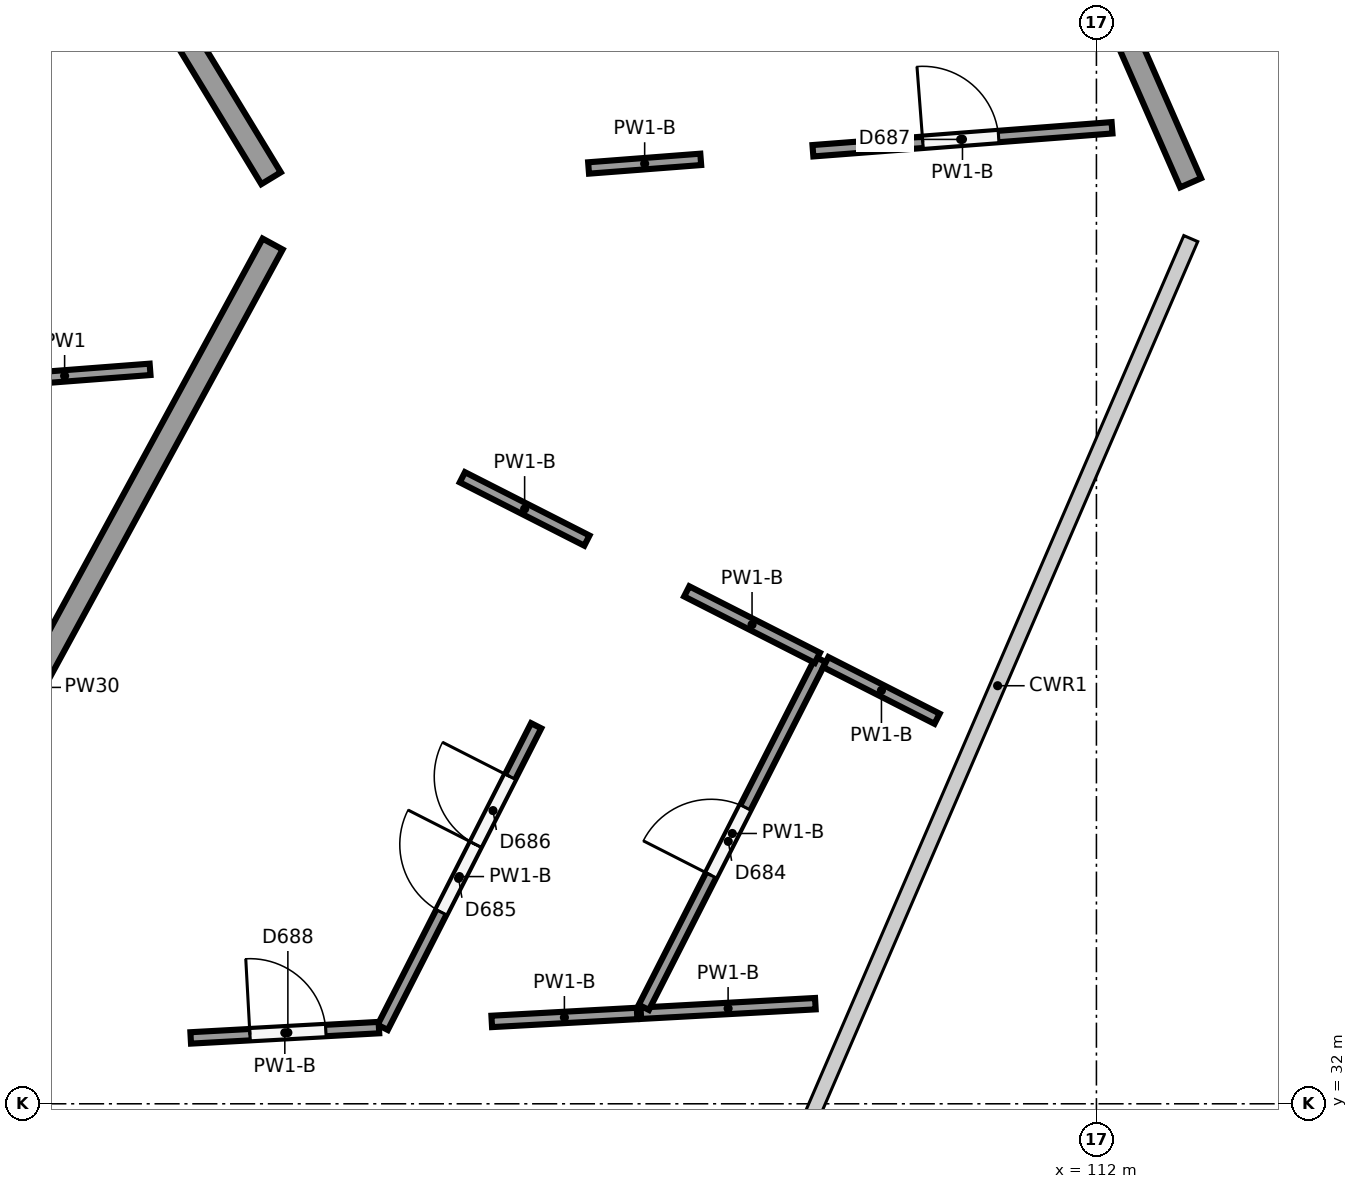
"""IFC4 building model, lengths in metres.
Left out: names, types, materials, properties, quantities, classifications, styles, units other than length and angle.
Written with IfcOpenShell. Run it as: python <this file> out.ifc"""

import sys

from ifc_helpers import new_model, si_unit, direction, frame, frame_2d, origin, origin_2d, place, context, subcontext, project, spatial, rectangle, circle, extrude, element, fill, save


model = new_model("IFC4")
c1 = context("Model", 3, precision=1e-05, world=origin(), true_north=direction((0.0, 1.0)))
c2 = subcontext(c1, "Body", "Model", "MODEL_VIEW")
j1 = project(units=[si_unit("LENGTHUNIT", "METRE"), si_unit("PLANEANGLEUNIT", "RADIAN")], contexts=[c1])
p1 = place(None, origin())
s1 = spatial("IfcSite", under=j1, at=p1, CompositionType="ELEMENT")
p2 = place(p1, origin())
s2 = spatial("IfcBuilding", under=s1, at=p2, CompositionType="ELEMENT")
p3 = place(p2, frame((0.0, 0.0, 6.5)))
s3 = spatial("IfcBuildingStorey", under=s2, at=p3, CompositionType="ELEMENT", Elevation=6.5)
p4 = place(p3, frame((101.4, 43.75, 0.0), z_axis=(0.0, 0.0, 1.0), x_axis=(1.0, 0.0, 0.0)))
e1 = element("IfcColumn", 1, at=p4, inside=s3, PredefinedType="COLUMN", context=c2, shape_type="SweptSolid", body=[
    extrude(circle(Radius=0.5, at=origin_2d()), origin(), (0.0, 0.0, 1.0), 5.5),
])
for number, where, z_axis, x_axis in (
    (2, (104.7, 43.75, 0.0), (0.0, 0.0, 1.0), (1.0, 0.0, 0.0)),
    (3, (108.0, 43.75, 0.0), (0.0, 0.0, 1.0), (1.0, 0.0, 0.0)),
    (4, (113.4, 43.75, 0.0), (0.0, 0.0, 1.0), (1.0, 0.0, 0.0)),
):
    element("IfcColumn", number, at=place(p3, frame(where, z_axis=z_axis, x_axis=x_axis)), inside=s3, PredefinedType="COLUMN", context=c2, shape_type="SweptSolid", body=[
        extrude(circle(Radius=0.4, at=origin_2d()), origin(), (0.0, 0.0, 1.0), 5.5),
    ])
p5 = place(p3, frame((107.771, 56.575, 0.0), z_axis=(0.0, 0.0, 1.0), x_axis=(0.401888790881, -0.915688484018, 0.0)))
e5 = element("IfcWall", 5, at=p5, inside=s3, PredefinedType="SOLIDWALL", context=c2, shape_type="SweptSolid", body=[
    extrude(rectangle(XDim=13.606, YDim=0.3, at=frame_2d((6.803, 0.0))), origin(), (0.0, 0.0, 1.0), 3.85),
])
p6 = place(p3, frame((101.161, 43.311, 0.0), z_axis=(0.0, 0.0, 1.0), x_axis=(-0.477867771117, -0.878431780691, 0.0)))
e6 = element("IfcWall", 6, at=p6, inside=s3, PredefinedType="SOLIDWALL", context=c2, shape_type="SweptSolid", body=[
    extrude(rectangle(XDim=13.28, YDim=0.3, at=frame_2d((6.64, 0.0))), origin(), (0.0, 0.0, 1.0), 3.85),
])
p7 = place(p6, frame((9.53, 0.0, 0.0)))
e7 = element("IfcOpeningElement", 7, at=p7, cuts=e6, PredefinedType="OPENING", context=c2, shape_type="SweptSolid", body=[
    extrude(rectangle(XDim=1.8, YDim=2.4, at=frame_2d((0.9, 1.2))), frame((0.0, 0.16, 0.0), z_axis=(0.0, -1.0, 0.0), x_axis=(1.0, 0.0, 0.0)), (0.0, 0.0, 1.0), 0.32),
])
p8 = place(p3, frame((94.528, 55.057, 0.0), z_axis=(0.0, 0.0, 1.0), x_axis=(0.519362860044, -0.854553813172, 0.0)))
e8 = element("IfcWall", 8, at=p8, inside=s3, PredefinedType="SOLIDWALL", context=c2, shape_type="SweptSolid", body=[
    extrude(rectangle(XDim=12.732, YDim=0.3, at=frame_2d((6.366, 0.0))), origin(), (0.0, 0.0, 1.0), 3.85),
])
p9 = place(p3, frame((97.3, 41.49, 0.0), z_axis=(0.0, 0.0, 1.0), x_axis=(0.99706720675, 0.076530942913, 0.0)))
e9 = element("IfcWall", 9, at=p9, inside=s3, PredefinedType="PARTITIONING", context=c2, shape_type="SweptSolid", body=[
    extrude(rectangle(XDim=2.255, YDim=0.15, at=frame_2d((1.128, 0.0))), origin(), (0.0, 0.0, 1.0), 5.15),
])
p10 = place(p3, frame((108.302, 33.317, 0.0), z_axis=(0.0, 0.0, 1.0), x_axis=(-0.998498017563, -0.054787853792, 0.0)))
e10 = element("IfcWall", 10, at=p10, inside=s3, PredefinedType="PARTITIONING", context=c2, shape_type="SweptSolid", body=[
    extrude(rectangle(XDim=2.299, YDim=0.15, at=frame_2d((1.15, 0.0))), origin(), (0.0, 0.0, 1.0), 5.05),
])
p11 = place(p3, frame((106.045, 33.268, 0.0), z_axis=(0.0, 0.0, 1.0), x_axis=(0.453347222961, 0.891333997688, 0.0)))
e11 = element("IfcWall", 11, at=p11, inside=s3, PredefinedType="PARTITIONING", context=c2, shape_type="SweptSolid", body=[
    extrude(rectangle(XDim=5.134, YDim=0.15, at=frame_2d((2.567, 0.0))), origin(), (0.0, 0.0, 1.0), 5.05),
])
p12 = place(p11, frame((1.95, 0.0, 0.0)))
e12 = element("IfcOpeningElement", 12, at=p12, cuts=e11, PredefinedType="OPENING", context=c2, shape_type="SweptSolid", body=[
    extrude(rectangle(XDim=1.0, YDim=2.1, at=frame_2d((0.5, 1.05))), frame((0.0, 0.085, 0.0), z_axis=(0.0, -1.0, 0.0), x_axis=(1.0, 0.0, 0.0)), (0.0, 0.0, 1.0), 0.17),
])
p13 = place(p3, frame((108.44, 37.81, 0.0), z_axis=(0.0, 0.0, 1.0), x_axis=(0.891343383036, -0.453328769788, 0.0)))
e13 = element("IfcWall", 13, at=p13, inside=s3, PredefinedType="PARTITIONING", context=c2, shape_type="SweptSolid", body=[
    extrude(rectangle(XDim=1.642, YDim=0.15, at=frame_2d((0.821, 0.0))), origin(), (0.0, 0.0, 1.0), 5.05),
])
p14 = place(p3, frame((105.956, 33.188, 0.0), z_axis=(0.0, 0.0, 1.0), x_axis=(-0.998496614233, -0.054813423225, 0.0)))
e14 = element("IfcWall", 14, at=p14, inside=s3, PredefinedType="PARTITIONING", context=c2, shape_type="SweptSolid", body=[
    extrude(rectangle(XDim=1.915, YDim=0.15, at=frame_2d((0.958, 0.0))), origin(), (0.0, 0.0, 1.0), 5.05),
])
p15 = place(p3, frame((102.61, 33.005, 0.0), z_axis=(0.0, 0.0, 1.0), x_axis=(0.453387706343, 0.891313406012, 0.0)))
e15 = element("IfcWall", 15, at=p15, inside=s3, PredefinedType="PARTITIONING", context=c2, shape_type="SweptSolid", body=[
    extrude(rectangle(XDim=4.453, YDim=0.15, at=frame_2d((2.226, 0.0))), origin(), (0.0, 0.0, 1.0), 5.05),
])
p16 = place(p15, frame((1.7, 0.0, 0.0)))
e16 = element("IfcOpeningElement", 16, at=p16, cuts=e15, PredefinedType="OPENING", context=c2, shape_type="SweptSolid", body=[
    extrude(rectangle(XDim=1.0, YDim=2.1, at=frame_2d((0.5, 1.05))), frame((0.0, 0.085, 0.0), z_axis=(0.0, -1.0, 0.0), x_axis=(1.0, 0.0, 0.0)), (0.0, 0.0, 1.0), 0.17),
])
p17 = place(p15, frame((2.7, 0.0, 0.0)))
e17 = element("IfcOpeningElement", 17, at=p17, cuts=e15, PredefinedType="OPENING", context=c2, shape_type="SweptSolid", body=[
    extrude(rectangle(XDim=1.0, YDim=2.1, at=frame_2d((0.5, 1.05))), frame((0.0, 0.085, 0.0), z_axis=(0.0, -1.0, 0.0), x_axis=(1.0, 0.0, 0.0)), (0.0, 0.0, 1.0), 0.17),
])
p18 = place(p3, frame((106.61, 38.741, 0.0), z_axis=(0.0, 0.0, 1.0), x_axis=(0.891316628882, -0.453381370458, 0.0)))
e18 = element("IfcWall", 18, at=p18, inside=s3, PredefinedType="PARTITIONING", context=c2, shape_type="SweptSolid", body=[
    extrude(rectangle(XDim=1.928, YDim=0.15, at=frame_2d((0.964, 0.0))), origin(), (0.0, 0.0, 1.0), 5.05),
])
p19 = place(p3, frame((100.083, 32.866, 0.0), z_axis=(0.0, 0.0, 1.0), x_axis=(0.998501563007, 0.054723200496, 0.0)))
e19 = element("IfcWall", 19, at=p19, inside=s3, PredefinedType="PARTITIONING", context=c2, shape_type="SweptSolid", body=[
    extrude(rectangle(XDim=2.48, YDim=0.15, at=frame_2d((1.24, 0.0))), origin(), (0.0, 0.0, 1.0), 5.05),
])
p20 = place(p19, frame((0.781, 0.0, 0.0)))
e20 = element("IfcOpeningElement", 20, at=p20, cuts=e19, PredefinedType="OPENING", context=c2, shape_type="SweptSolid", body=[
    extrude(rectangle(XDim=1.0, YDim=2.1, at=frame_2d((0.5, 1.05))), frame((0.0, 0.085, 0.0), z_axis=(0.0, -1.0, 0.0), x_axis=(1.0, 0.0, 0.0)), (0.0, 0.0, 1.0), 0.17),
])
p21 = place(p3, frame((103.658, 40.243, 0.0), z_axis=(0.0, 0.0, 1.0), x_axis=(0.891270496186, -0.453472052754, 0.0)))
e21 = element("IfcWall", 21, at=p21, inside=s3, PredefinedType="PARTITIONING", context=c2, shape_type="SweptSolid", body=[
    extrude(rectangle(XDim=1.838, YDim=0.15, at=frame_2d((0.919, 0.0))), origin(), (0.0, 0.0, 1.0), 5.05),
])
p22 = place(p3, frame((105.318, 44.312, 0.0), z_axis=(0.0, 0.0, 1.0), x_axis=(0.997067085138, 0.076532527296, 0.0)))
e22 = element("IfcWall", 22, at=p22, inside=s3, PredefinedType="PARTITIONING", context=c2, shape_type="SweptSolid", body=[
    extrude(rectangle(XDim=1.48, YDim=0.15, at=frame_2d((0.74, 0.0))), origin(), (0.0, 0.0, 1.0), 5.05),
])
p23 = place(p3, frame((108.27, 44.538, 0.0), z_axis=(0.0, 0.0, 1.0), x_axis=(0.997068658219, 0.07651203041, 0.0)))
e23 = element("IfcWall", 23, at=p23, inside=s3, PredefinedType="PARTITIONING", context=c2, shape_type="SweptSolid", body=[
    extrude(rectangle(XDim=3.947, YDim=0.15, at=frame_2d((1.974, 0.0))), origin(), (0.0, 0.0, 1.0), 5.05),
])
p24 = place(p23, frame((1.45, 0.0, 0.0)))
e24 = element("IfcOpeningElement", 24, at=p24, cuts=e23, PredefinedType="OPENING", context=c2, shape_type="SweptSolid", body=[
    extrude(rectangle(XDim=1.0, YDim=2.1, at=frame_2d((0.5, 1.05))), frame((0.0, 0.085, 0.0), z_axis=(0.0, -1.0, 0.0), x_axis=(1.0, 0.0, 0.0)), (0.0, 0.0, 1.0), 0.17),
])
p25 = place(p12, origin())
e25 = element("IfcDoor", 25, at=p25, inside=s3, OperationType="SINGLE_SWING_LEFT", PredefinedType="DOOR", context=c2, shape_type="SweptSolid", body=[
    extrude(rectangle(XDim=1.0, YDim=2.1, at=frame_2d((0.5, 1.05))), frame((0.0, 0.025, 0.0), z_axis=(0.0, -1.0, 0.0), x_axis=(1.0, 0.0, 0.0)), (0.0, 0.0, 1.0), 0.05),
])
fill(e12, e25)
p26 = place(p16, origin())
e26 = element("IfcDoor", 26, at=p26, inside=s3, OperationType="SINGLE_SWING_RIGHT", PredefinedType="DOOR", context=c2, shape_type="SweptSolid", body=[
    extrude(rectangle(XDim=1.0, YDim=2.1, at=frame_2d((0.5, 1.05))), frame((0.0, 0.025, 0.0), z_axis=(0.0, -1.0, 0.0), x_axis=(1.0, 0.0, 0.0)), (0.0, 0.0, 1.0), 0.05),
])
fill(e16, e26)
p27 = place(p17, origin())
e27 = element("IfcDoor", 27, at=p27, inside=s3, OperationType="SINGLE_SWING_RIGHT", PredefinedType="DOOR", context=c2, shape_type="SweptSolid", body=[
    extrude(rectangle(XDim=1.0, YDim=2.1, at=frame_2d((0.5, 1.05))), frame((0.0, 0.025, 0.0), z_axis=(0.0, -1.0, 0.0), x_axis=(1.0, 0.0, 0.0)), (0.0, 0.0, 1.0), 0.05),
])
fill(e17, e27)
p28 = place(p20, origin())
e28 = element("IfcDoor", 28, at=p28, inside=s3, OperationType="SINGLE_SWING_LEFT", PredefinedType="DOOR", context=c2, shape_type="SweptSolid", body=[
    extrude(rectangle(XDim=1.0, YDim=2.1, at=frame_2d((0.5, 1.05))), frame((0.0, 0.025, 0.0), z_axis=(0.0, -1.0, 0.0), x_axis=(1.0, 0.0, 0.0)), (0.0, 0.0, 1.0), 0.05),
])
fill(e20, e28)
p29 = place(p24, origin())
e29 = element("IfcDoor", 29, at=p29, inside=s3, OperationType="SINGLE_SWING_LEFT", PredefinedType="DOOR", context=c2, shape_type="SweptSolid", body=[
    extrude(rectangle(XDim=1.0, YDim=2.1, at=frame_2d((0.5, 1.05))), frame((0.0, 0.025, 0.0), z_axis=(0.0, -1.0, 0.0), x_axis=(1.0, 0.0, 0.0)), (0.0, 0.0, 1.0), 0.05),
])
fill(e24, e29)
save(model, sys.argv[1])
